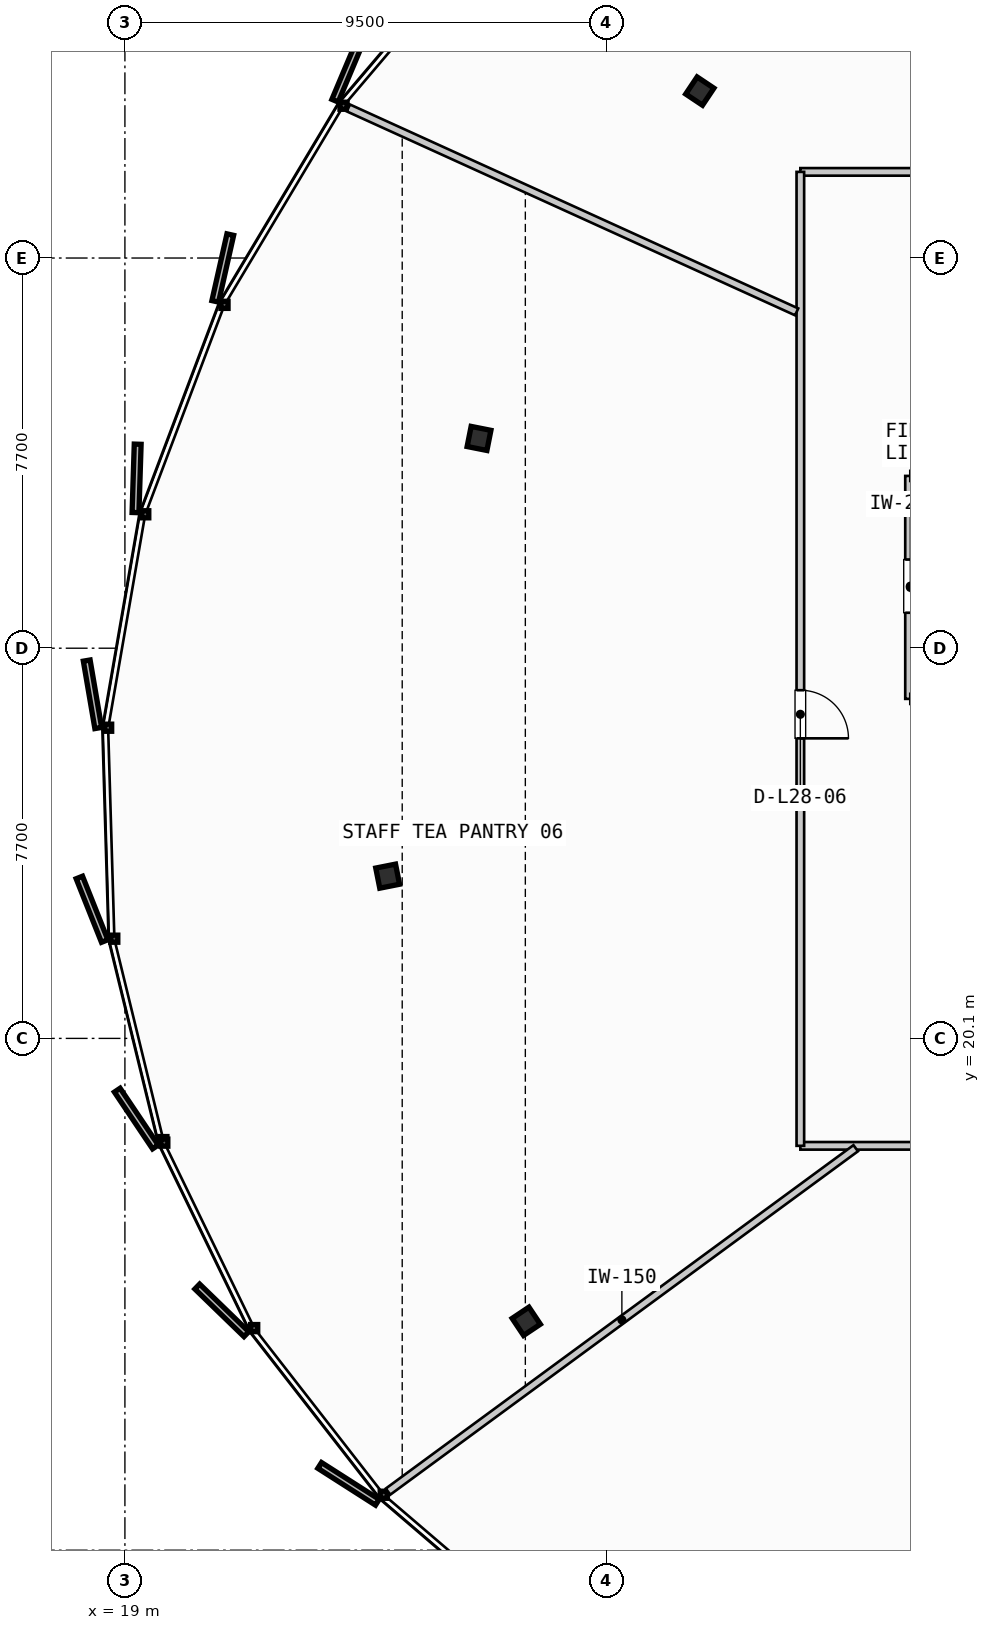
"""IFC4 building model, lengths in metres.
Left out: names, types, materials, properties, quantities, classifications, styles, units other than length and angle.
Written with IfcOpenShell. Run it as: python <this file> out.ifc"""

import sys

from ifc_helpers import new_model, si_unit, direction, frame, frame_2d, origin, origin_2d, place, context, subcontext, project, spatial, rectangle, i_section, extrude, source, transform, mapped, element, fill, save


model = new_model("IFC4")
c1 = context("Model", 3, precision=1e-05, world=origin(), true_north=direction((0.0, 1.0)))
c2 = subcontext(c1, "Body", "Model", "MODEL_VIEW")
j1 = project(units=[si_unit("LENGTHUNIT", "METRE"), si_unit("PLANEANGLEUNIT", "RADIAN")], contexts=[c1])
p1 = place(None, origin())
s1 = spatial("IfcSite", under=j1, at=p1, CompositionType="ELEMENT")
p2 = place(p1, origin())
s2 = spatial("IfcBuilding", under=s1, at=p2, CompositionType="ELEMENT")
p3 = place(p2, frame((0.0, 0.0, 114.4)))
s3 = spatial("IfcBuildingStorey", under=s2, at=p3, CompositionType="ELEMENT", Elevation=114.4)
m1 = source(origin(), c2, "Body", "SweptSolid", [
    extrude(i_section(OverallWidth=0.405, OverallDepth=0.398, WebThickness=0.035, FlangeThickness=0.056, FilletRadius=0.015, at=origin_2d()), origin(), (0.0, 0.0, 1.0), 3.35),
])
for number, where, z_axis, x_axis in (
    (1, (30.346, 38.794, 0.0), (0.0, 0.0, 1.0), (-0.831, 0.556, 0.0)),
    (2, (25.989, 31.94, 0.0), (0.0, 0.0, 1.0), (-0.981, 0.195, 0.0)),
    (3, (24.185, 23.302, 0.0), (0.0, 0.0, 1.0), (-0.981, -0.195, 0.0)),
    (4, (26.921, 14.517, 0.0), (0.0, 0.0, 1.0), (-0.831, -0.556, 0.0)),
):
    element("IfcColumn", number, at=place(p3, frame(where, z_axis=z_axis, x_axis=x_axis)), inside=s3, PredefinedType="COLUMN", context=c2, shape_type="MappedRepresentation", body=[
        mapped(m1, transform((0.0, 0.0, 0.0), scale=1.0)),
    ])
p4 = place(p3, frame((34.5, 31.2, 0.0), z_axis=(0.0, 0.0, 1.0), x_axis=(0.0, -1.0, 0.0)))
e5 = element("IfcWall", 5, at=p4, inside=s3, PredefinedType="PARTITIONING", context=c2, shape_type="SweptSolid", body=[
    extrude(rectangle(XDim=4.4, YDim=0.2, at=frame_2d((2.2, 0.0))), origin(), (0.0, 0.0, 1.0), 2.28),
])
p5 = place(p4, frame((1.65, 0.0, 0.0)))
e6 = element("IfcOpeningElement", 6, at=p5, cuts=e5, PredefinedType="OPENING", context=c2, shape_type="SweptSolid", body=[
    extrude(rectangle(XDim=1.05, YDim=2.15, at=frame_2d((0.525, 1.075))), frame((0.0, 0.11, 0.0), z_axis=(0.0, -1.0, 0.0), x_axis=(1.0, 0.0, 0.0)), (0.0, 0.0, 1.0), 0.22),
])
p6 = place(p3, frame((32.33, 17.98, 0.0), z_axis=(0.0, 0.0, 1.0), x_axis=(1.0, 0.0, 0.0)))
e7 = element("IfcWall", 7, at=p6, inside=s3, PredefinedType="PARTITIONING", context=c2, shape_type="SweptSolid", body=[
    extrude(rectangle(XDim=30.5, YDim=0.15, at=frame_2d((15.25, 0.0))), origin(), (0.0, 0.0, 1.0), 2.28),
])
p7 = place(p6, frame((14.968, 0.0, 0.0)))
e8 = element("IfcOpeningElement", 8, at=p7, cuts=e7, PredefinedType="OPENING", context=c2, shape_type="SweptSolid", body=[
    extrude(rectangle(XDim=0.95, YDim=2.15, at=frame_2d((0.475, 1.075))), frame((0.0, 0.085, 0.0), z_axis=(0.0, -1.0, 0.0), x_axis=(1.0, 0.0, 0.0)), (0.0, 0.0, 1.0), 0.17),
])
p8 = place(p3, frame((62.83, 37.2, 0.0), z_axis=(0.0, 0.0, 1.0), x_axis=(-1.0, 0.0, 0.0)))
e9 = element("IfcWall", 9, at=p8, inside=s3, PredefinedType="PARTITIONING", context=c2, shape_type="SweptSolid", body=[
    extrude(rectangle(XDim=30.5, YDim=0.15, at=frame_2d((15.25, 0.0))), origin(), (0.0, 0.0, 1.0), 2.28),
])
p9 = place(p8, frame((5.51, 0.0, 0.0)))
e10 = element("IfcOpeningElement", 10, at=p9, cuts=e9, PredefinedType="OPENING", context=c2, shape_type="SweptSolid", body=[
    extrude(rectangle(XDim=0.95, YDim=2.15, at=frame_2d((0.475, 1.075))), frame((0.0, 0.085, 0.0), z_axis=(0.0, -1.0, 0.0), x_axis=(1.0, 0.0, 0.0)), (0.0, 0.0, 1.0), 0.17),
])
p10 = place(p8, frame((20.164, 0.0, 0.0)))
e11 = element("IfcOpeningElement", 11, at=p10, cuts=e9, PredefinedType="OPENING", context=c2, shape_type="SweptSolid", body=[
    extrude(rectangle(XDim=0.95, YDim=2.15, at=frame_2d((0.475, 1.075))), frame((0.0, 0.085, 0.0), z_axis=(0.0, -1.0, 0.0), x_axis=(1.0, 0.0, 0.0)), (0.0, 0.0, 1.0), 0.17),
])
p11 = place(p3, frame((32.33, 37.2, 0.0), z_axis=(0.0, 0.0, 1.0), x_axis=(0.0, -1.0, 0.0)))
e12 = element("IfcWall", 12, at=p11, inside=s3, PredefinedType="PARTITIONING", context=c2, shape_type="SweptSolid", body=[
    extrude(rectangle(XDim=19.22, YDim=0.15, at=frame_2d((9.61, 0.0))), origin(), (0.0, 0.0, 1.0), 2.28),
])
p12 = place(p11, frame((10.229, 0.0, 0.0)))
e13 = element("IfcOpeningElement", 13, at=p12, cuts=e12, PredefinedType="OPENING", context=c2, shape_type="SweptSolid", body=[
    extrude(rectangle(XDim=0.95, YDim=2.15, at=frame_2d((0.475, 1.075))), frame((0.0, 0.085, 0.0), z_axis=(0.0, -1.0, 0.0), x_axis=(1.0, 0.0, 0.0)), (0.0, 0.0, 1.0), 0.17),
])
p13 = place(p3, frame((33.423, 17.933, 0.0), z_axis=(0.0, 0.0, 1.0), x_axis=(-0.806068638556, -0.591822059353, 0.0)))
e14 = element("IfcWall", 14, at=p13, inside=s3, PredefinedType="PARTITIONING", context=c2, shape_type="SweptSolid", body=[
    extrude(rectangle(XDim=11.45, YDim=0.15, at=frame_2d((5.725, 0.0))), origin(), (0.0, 0.0, 1.0), 2.28),
])
p14 = place(p3, frame((32.257, 34.438, 0.0), z_axis=(0.0, 0.0, 1.0), x_axis=(-0.910252025758, 0.414054645672, 0.0)))
e15 = element("IfcWall", 15, at=p14, inside=s3, PredefinedType="PARTITIONING", context=c2, shape_type="SweptSolid", body=[
    extrude(rectangle(XDim=9.719, YDim=0.15, at=frame_2d((4.859, 0.0))), origin(), (0.0, 0.0, 1.0), 2.28),
])
m2 = source(origin(), c2, "Body", "SweptSolid", [
    extrude(rectangle(XDim=1.05, YDim=2.15, at=frame_2d((0.525, 1.075))), frame((0.0, 0.025, 0.0), z_axis=(0.0, -1.0, 0.0), x_axis=(1.0, 0.0, 0.0)), (0.0, 0.0, 1.0), 0.05),
])
p15 = place(p5, origin())
e16 = element("IfcDoor", 16, at=p15, inside=s3, OperationType="SINGLE_SWING_LEFT", PredefinedType="DOOR", context=c2, shape_type="MappedRepresentation", body=[
    mapped(m2, transform((0.0, 0.0, 0.0), scale=1.0)),
])
fill(e6, e16)
m3 = source(origin(), c2, "Body", "SweptSolid", [
    extrude(rectangle(XDim=0.95, YDim=2.15, at=frame_2d((0.475, 1.075))), frame((0.0, 0.025, 0.0), z_axis=(0.0, -1.0, 0.0), x_axis=(1.0, 0.0, 0.0)), (0.0, 0.0, 1.0), 0.05),
])
p16 = place(p12, origin())
e17 = element("IfcDoor", 17, at=p16, inside=s3, OperationType="SINGLE_SWING_RIGHT", PredefinedType="DOOR", context=c2, shape_type="MappedRepresentation", body=[
    mapped(m3, transform((0.0, 0.0, 0.0), scale=1.0)),
])
fill(e13, e17)
save(model, sys.argv[1])
